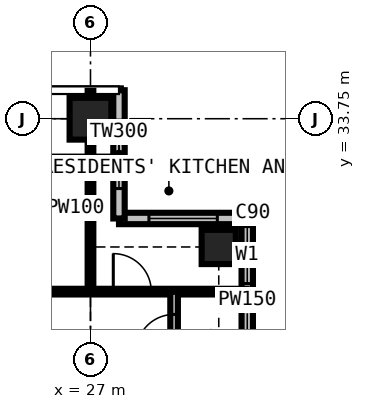
"""IFC4 building model, lengths in metres.
Left out: names, types, materials, properties, quantities, classifications, styles, units other than length and angle.
Written with IfcOpenShell. Run it as: python <this file> out.ifc"""

import sys

from ifc_helpers import new_model, si_unit, direction, frame, frame_2d, origin, origin_2d, place, context, subcontext, project, spatial, rectangle, extrude, element, fill, save


model = new_model("IFC4")
c1 = context("Model", 3, precision=1e-05, world=origin(), true_north=direction((0.0, 1.0)))
c2 = subcontext(c1, "Body", "Model", "MODEL_VIEW")
j1 = project(units=[si_unit("LENGTHUNIT", "METRE"), si_unit("PLANEANGLEUNIT", "RADIAN")], contexts=[c1])
p1 = place(None, origin())
s1 = spatial("IfcSite", under=j1, at=p1, CompositionType="ELEMENT")
p2 = place(p1, origin())
s2 = spatial("IfcBuilding", under=s1, at=p2, CompositionType="ELEMENT")
p3 = place(p2, frame((0.0, 0.0, 211.5)))
s3 = spatial("IfcBuildingStorey", under=s2, at=p3, CompositionType="ELEMENT", Elevation=211.5)
p4 = place(p3, frame((27.0, 33.75, 0.0), z_axis=(0.0, 0.0, 1.0), x_axis=(1.0, 0.0, 0.0)))
e1 = element("IfcColumn", 1, at=p4, inside=s3, PredefinedType="COLUMN", context=c2, shape_type="SweptSolid", body=[
    extrude(rectangle(XDim=1.1, YDim=1.1, at=origin_2d()), origin(), (0.0, 0.0, 1.0), 3.6),
])
p5 = place(p3, frame((30.375, 30.375, 0.0), z_axis=(0.0, 0.0, 1.0), x_axis=(1.0, 0.0, 0.0)))
e2 = element("IfcColumn", 2, at=p5, inside=s3, PredefinedType="COLUMN", context=c2, shape_type="SweptSolid", body=[
    extrude(rectangle(XDim=0.9, YDim=0.9, at=origin_2d()), origin(), (0.0, 0.0, 1.0), 3.6),
])
p6 = place(p3, frame((31.125, 27.75, 0.0), z_axis=(0.0, 0.0, 1.0), x_axis=(0.0, 1.0, 0.0)))
e3 = element("IfcWall", 3, at=p6, inside=s3, PredefinedType="SOLIDWALL", context=c2, shape_type="SweptSolid", body=[
    extrude(rectangle(XDim=3.375, YDim=0.3, at=frame_2d((1.688, 0.0))), origin(), (0.0, 0.0, 1.0), 3.375),
])
p7 = place(p6, frame((1.663, 0.0, 0.9)))
e4 = element("IfcOpeningElement", 4, at=p7, cuts=e3, PredefinedType="OPENING", context=c2, shape_type="SweptSolid", body=[
    extrude(rectangle(XDim=1.5, YDim=1.8, at=frame_2d((0.75, 0.9))), frame((0.0, 0.16, 0.0), z_axis=(0.0, -1.0, 0.0), x_axis=(1.0, 0.0, 0.0)), (0.0, 0.0, 1.0), 0.32),
])
p8 = place(p3, frame((31.125, 31.125, 0.0), z_axis=(0.0, 0.0, 1.0), x_axis=(-1.0, 0.0, 0.0)))
e5 = element("IfcWall", 5, at=p8, inside=s3, PredefinedType="SOLIDWALL", context=c2, shape_type="SweptSolid", body=[
    extrude(rectangle(XDim=3.375, YDim=0.3, at=frame_2d((1.688, 0.0))), origin(), (0.0, 0.0, 1.0), 3.375),
])
p9 = place(p8, frame((0.788, 0.0, 0.6)))
e6 = element("IfcOpeningElement", 6, at=p9, cuts=e5, PredefinedType="OPENING", context=c2, shape_type="SweptSolid", body=[
    extrude(rectangle(XDim=1.8, YDim=2.1, at=frame_2d((0.9, 1.05))), frame((0.0, 0.16, 0.0), z_axis=(0.0, -1.0, 0.0), x_axis=(1.0, 0.0, 0.0)), (0.0, 0.0, 1.0), 0.32),
])
p10 = place(p3, frame((27.75, 31.125, 0.0), z_axis=(0.0, 0.0, 1.0), x_axis=(0.0, 1.0, 0.0)))
e7 = element("IfcWall", 7, at=p10, inside=s3, PredefinedType="SOLIDWALL", context=c2, shape_type="SweptSolid", body=[
    extrude(rectangle(XDim=3.375, YDim=0.3, at=frame_2d((1.688, 0.0))), origin(), (0.0, 0.0, 1.0), 3.375),
])
p11 = place(p10, frame((0.788, 0.0, 0.6)))
e8 = element("IfcOpeningElement", 8, at=p11, cuts=e7, PredefinedType="OPENING", context=c2, shape_type="SweptSolid", body=[
    extrude(rectangle(XDim=1.8, YDim=2.1, at=frame_2d((0.9, 1.05))), frame((0.0, 0.16, 0.0), z_axis=(0.0, -1.0, 0.0), x_axis=(1.0, 0.0, 0.0)), (0.0, 0.0, 1.0), 0.32),
])
p12 = place(p3, frame((11.3, 29.2, 0.0), z_axis=(0.0, 0.0, 1.0), x_axis=(1.0, 0.0, 0.0)))
e9 = element("IfcWall", 9, at=p12, inside=s3, PredefinedType="PARTITIONING", context=c2, shape_type="SweptSolid", body=[
    extrude(rectangle(XDim=19.809, YDim=0.15, at=frame_2d((9.904, 0.0))), origin(), (0.0, 0.0, 1.0), 3.375),
])
p13 = place(p12, frame((16.3, 0.0, 0.0)))
e10 = element("IfcOpeningElement", 10, at=p13, cuts=e9, PredefinedType="OPENING", context=c2, shape_type="SweptSolid", body=[
    extrude(rectangle(XDim=1.0, YDim=2.2, at=frame_2d((0.5, 1.1))), frame((0.0, 0.085, 0.0), z_axis=(0.0, -1.0, 0.0), x_axis=(1.0, 0.0, 0.0)), (0.0, 0.0, 1.0), 0.17),
])
p14 = place(p12, frame((5.825, 0.0, 0.0)))
e11 = element("IfcOpeningElement", 11, at=p14, cuts=e9, PredefinedType="OPENING", context=c2, shape_type="SweptSolid", body=[
    extrude(rectangle(XDim=0.95, YDim=2.2, at=frame_2d((0.475, 1.1))), frame((0.0, 0.085, 0.0), z_axis=(0.0, -1.0, 0.0), x_axis=(1.0, 0.0, 0.0)), (0.0, 0.0, 1.0), 0.17),
])
p15 = place(p12, frame((9.2, 0.0, 0.0)))
e12 = element("IfcOpeningElement", 12, at=p15, cuts=e9, PredefinedType="OPENING", context=c2, shape_type="SweptSolid", body=[
    extrude(rectangle(XDim=0.95, YDim=2.2, at=frame_2d((0.475, 1.1))), frame((0.0, 0.085, 0.0), z_axis=(0.0, -1.0, 0.0), x_axis=(1.0, 0.0, 0.0)), (0.0, 0.0, 1.0), 0.17),
])
p16 = place(p12, frame((12.575, 0.0, 0.0)))
e13 = element("IfcOpeningElement", 13, at=p16, cuts=e9, PredefinedType="OPENING", context=c2, shape_type="SweptSolid", body=[
    extrude(rectangle(XDim=0.95, YDim=2.2, at=frame_2d((0.475, 1.1))), frame((0.0, 0.085, 0.0), z_axis=(0.0, -1.0, 0.0), x_axis=(1.0, 0.0, 0.0)), (0.0, 0.0, 1.0), 0.17),
])
p17 = place(p12, frame((0.6, 0.0, 0.0)))
e14 = element("IfcOpeningElement", 14, at=p17, cuts=e9, PredefinedType="OPENING", context=c2, shape_type="SweptSolid", body=[
    extrude(rectangle(XDim=1.0, YDim=2.2, at=frame_2d((0.5, 1.1))), frame((0.0, 0.085, 0.0), z_axis=(0.0, -1.0, 0.0), x_axis=(1.0, 0.0, 0.0)), (0.0, 0.0, 1.0), 0.17),
])
p18 = place(p3, frame((25.0, 31.4, 0.0), z_axis=(0.0, 0.0, 1.0), x_axis=(1.0, 0.0, 0.0)))
e15 = element("IfcWall", 15, at=p18, inside=s3, PredefinedType="PARTITIONING", context=c2, shape_type="SweptSolid", body=[
    extrude(rectangle(XDim=2.0, YDim=0.1, at=frame_2d((1.0, 0.0))), origin(), (0.0, 0.0, 1.0), 3.375),
])
p19 = place(p3, frame((27.0, 29.2, 0.0), z_axis=(0.0, 0.0, 1.0), x_axis=(0.0, 1.0, 0.0)))
e16 = element("IfcWall", 16, at=p19, inside=s3, PredefinedType="PARTITIONING", context=c2, shape_type="SweptSolid", body=[
    extrude(rectangle(XDim=5.284, YDim=0.15, at=frame_2d((2.642, 0.0))), origin(), (0.0, 0.0, 1.0), 2.877),
])
p20 = place(p3, frame((29.2, 11.3, 0.0), z_axis=(0.0, 0.0, 1.0), x_axis=(0.0, 1.0, 0.0)))
e17 = element("IfcWall", 17, at=p20, inside=s3, PredefinedType="PARTITIONING", context=c2, shape_type="SweptSolid", body=[
    extrude(rectangle(XDim=17.9, YDim=0.2, at=frame_2d((8.95, 0.0))), origin(), (0.0, 0.0, 1.0), 3.375),
])
p21 = place(p20, frame((2.3, 0.0, 0.0)))
e18 = element("IfcOpeningElement", 18, at=p21, cuts=e17, PredefinedType="OPENING", context=c2, shape_type="SweptSolid", body=[
    extrude(rectangle(XDim=1.0, YDim=2.2, at=frame_2d((0.5, 1.1))), frame((0.0, 0.11, 0.0), z_axis=(0.0, -1.0, 0.0), x_axis=(1.0, 0.0, 0.0)), (0.0, 0.0, 1.0), 0.22),
])
p22 = place(p20, frame((5.775, 0.0, 0.0)))
e19 = element("IfcOpeningElement", 19, at=p22, cuts=e17, PredefinedType="OPENING", context=c2, shape_type="SweptSolid", body=[
    extrude(rectangle(XDim=0.95, YDim=2.2, at=frame_2d((0.475, 1.1))), frame((0.0, 0.11, 0.0), z_axis=(0.0, -1.0, 0.0), x_axis=(1.0, 0.0, 0.0)), (0.0, 0.0, 1.0), 0.22),
])
p23 = place(p20, frame((9.2, 0.0, 0.0)))
e20 = element("IfcOpeningElement", 20, at=p23, cuts=e17, PredefinedType="OPENING", context=c2, shape_type="SweptSolid", body=[
    extrude(rectangle(XDim=0.95, YDim=2.2, at=frame_2d((0.475, 1.1))), frame((0.0, 0.11, 0.0), z_axis=(0.0, -1.0, 0.0), x_axis=(1.0, 0.0, 0.0)), (0.0, 0.0, 1.0), 0.22),
])
p24 = place(p20, frame((12.575, 0.0, 0.0)))
e21 = element("IfcOpeningElement", 21, at=p24, cuts=e17, PredefinedType="OPENING", context=c2, shape_type="SweptSolid", body=[
    extrude(rectangle(XDim=0.95, YDim=2.2, at=frame_2d((0.475, 1.1))), frame((0.0, 0.11, 0.0), z_axis=(0.0, -1.0, 0.0), x_axis=(1.0, 0.0, 0.0)), (0.0, 0.0, 1.0), 0.22),
])
p25 = place(p20, frame((16.3, 0.0, 0.0)))
e22 = element("IfcOpeningElement", 22, at=p25, cuts=e17, PredefinedType="OPENING", context=c2, shape_type="SweptSolid", body=[
    extrude(rectangle(XDim=1.0, YDim=2.2, at=frame_2d((0.5, 1.1))), frame((0.0, 0.11, 0.0), z_axis=(0.0, -1.0, 0.0), x_axis=(1.0, 0.0, 0.0)), (0.0, 0.0, 1.0), 0.22),
])
p26 = place(p7, origin())
e23 = element("IfcWindow", 23, at=p26, inside=s3, PartitioningType="SINGLE_PANEL", PredefinedType="WINDOW", context=c2, shape_type="SweptSolid", body=[
    extrude(rectangle(XDim=1.5, YDim=1.8, at=frame_2d((0.75, 0.9))), frame((0.0, 0.03, 0.0), z_axis=(0.0, -1.0, 0.0), x_axis=(1.0, 0.0, 0.0)), (0.0, 0.0, 1.0), 0.06),
])
fill(e4, e23)
p27 = place(p9, origin())
e24 = element("IfcWindow", 24, at=p27, inside=s3, PartitioningType="SINGLE_PANEL", PredefinedType="WINDOW", context=c2, shape_type="SweptSolid", body=[
    extrude(rectangle(XDim=1.8, YDim=2.1, at=frame_2d((0.9, 1.05))), frame((0.0, 0.03, 0.0), z_axis=(0.0, -1.0, 0.0), x_axis=(1.0, 0.0, 0.0)), (0.0, 0.0, 1.0), 0.06),
])
fill(e6, e24)
p28 = place(p11, origin())
e25 = element("IfcWindow", 25, at=p28, inside=s3, PartitioningType="SINGLE_PANEL", PredefinedType="WINDOW", context=c2, shape_type="SweptSolid", body=[
    extrude(rectangle(XDim=1.8, YDim=2.1, at=frame_2d((0.9, 1.05))), frame((0.0, 0.03, 0.0), z_axis=(0.0, -1.0, 0.0), x_axis=(1.0, 0.0, 0.0)), (0.0, 0.0, 1.0), 0.06),
])
fill(e8, e25)
p29 = place(p25, origin())
e26 = element("IfcDoor", 26, at=p29, inside=s3, OperationType="SINGLE_SWING_LEFT", PredefinedType="DOOR", context=c2, shape_type="SweptSolid", body=[
    extrude(rectangle(XDim=1.0, YDim=2.2, at=frame_2d((0.5, 1.1))), frame((0.0, 0.025, 0.0), z_axis=(0.0, -1.0, 0.0), x_axis=(1.0, 0.0, 0.0)), (0.0, 0.0, 1.0), 0.05),
])
fill(e22, e26)
p30 = place(p13, origin())
e27 = element("IfcDoor", 27, at=p30, inside=s3, OperationType="SINGLE_SWING_LEFT", PredefinedType="DOOR", context=c2, shape_type="SweptSolid", body=[
    extrude(rectangle(XDim=1.0, YDim=2.2, at=frame_2d((0.5, 1.1))), frame((0.0, 0.025, 0.0), z_axis=(0.0, -1.0, 0.0), x_axis=(1.0, 0.0, 0.0)), (0.0, 0.0, 1.0), 0.05),
])
fill(e10, e27)
save(model, sys.argv[1])
